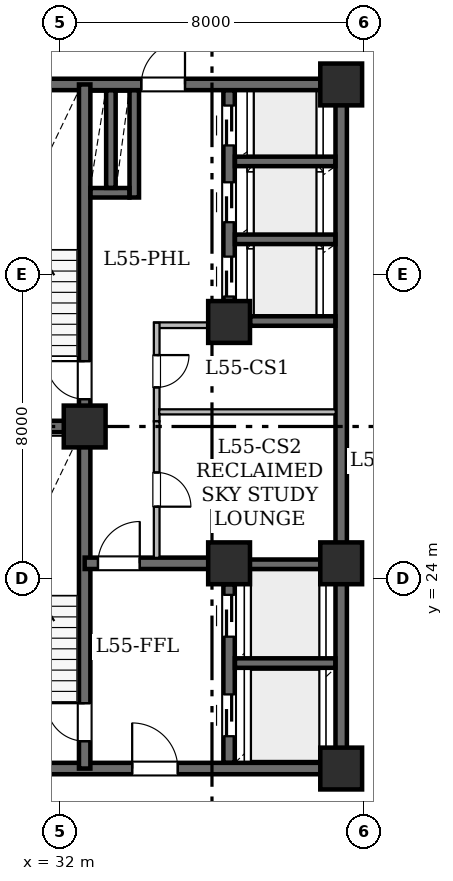
"""IFC4 building model, lengths in metres.
Left out: names, types, materials, properties, quantities, classifications, styles, units other than length and angle.
Written with IfcOpenShell. Run it as: python <this file> out.ifc"""

import sys

from ifc_helpers import new_model, si_unit, direction, frame, frame_2d, origin, origin_2d, place, context, subcontext, project, spatial, rectangle, hollow_rectangle, extrude, element, fill, save


model = new_model("IFC4")
c1 = context("Model", 3, precision=1e-05, world=origin(), true_north=direction((0.0, 1.0)))
c2 = subcontext(c1, "Body", "Model", "MODEL_VIEW")
j1 = project(units=[si_unit("LENGTHUNIT", "METRE"), si_unit("PLANEANGLEUNIT", "RADIAN")], contexts=[c1])
p1 = place(None, origin())
s1 = spatial("IfcSite", under=j1, at=p1, CompositionType="ELEMENT")
p2 = place(p1, origin())
s2 = spatial("IfcBuilding", under=s1, at=p2, CompositionType="ELEMENT")
p3 = place(p2, frame((0.0, 0.0, 217.2)))
s3 = spatial("IfcBuildingStorey", under=s2, at=p3, CompositionType="ELEMENT", Elevation=217.2)
for number, where, z_axis, x_axis in (
    (1, (32.65, 28.0, 0.0), (0.0, 0.0, 1.0), (1.0, 0.0, 0.0)),
    (2, (39.4, 19.0, 0.0), (0.0, 0.0, 1.0), (1.0, 0.0, 0.0)),
    (3, (36.45, 24.4, 0.0), (0.0, 0.0, 1.0), (1.0, 0.0, 0.0)),
    (4, (39.4, 24.4, 0.0), (0.0, 0.0, 1.0), (1.0, 0.0, 0.0)),
    (5, (36.45, 30.75, 0.0), (0.0, 0.0, 1.0), (1.0, 0.0, 0.0)),
    (6, (39.4, 37.0, 0.0), (0.0, 0.0, 1.0), (1.0, 0.0, 0.0)),
):
    element("IfcColumn", number, at=place(p3, frame(where, z_axis=z_axis, x_axis=x_axis)), inside=s3, PredefinedType="COLUMN", context=c2, shape_type="SweptSolid", body=[
        extrude(hollow_rectangle(XDim=1.1, YDim=1.1, WallThickness=0.055, at=origin_2d()), origin(), (0.0, 0.0, 1.0), 3.65),
    ])
p4 = place(p3, frame((29.0, 19.0, 0.0), z_axis=(0.0, 0.0, 1.0), x_axis=(1.0, 0.0, 0.0)))
e7 = element("IfcWall", 7, at=p4, inside=s3, PredefinedType="SHEAR", context=c2, shape_type="SweptSolid", body=[
    extrude(rectangle(XDim=10.4, YDim=0.3, at=frame_2d((5.2, 0.0))), origin(), (0.0, 0.0, 1.0), 3.43),
])
p5 = place(p4, frame((4.9, 0.0, 0.0)))
e8 = element("IfcOpeningElement", 8, at=p5, cuts=e7, PredefinedType="OPENING", context=c2, shape_type="SweptSolid", body=[
    extrude(rectangle(XDim=1.2, YDim=2.15, at=frame_2d((0.6, 1.075))), frame((0.0, 0.16, 0.0), z_axis=(0.0, -1.0, 0.0), x_axis=(1.0, 0.0, 0.0)), (0.0, 0.0, 1.0), 0.32),
])
p6 = place(p3, frame((29.0, 37.0, 0.0), z_axis=(0.0, 0.0, 1.0), x_axis=(1.0, 0.0, 0.0)))
e9 = element("IfcWall", 9, at=p6, inside=s3, PredefinedType="SHEAR", context=c2, shape_type="SweptSolid", body=[
    extrude(rectangle(XDim=10.4, YDim=0.3, at=frame_2d((5.2, 0.0))), origin(), (0.0, 0.0, 1.0), 3.43),
])
p7 = place(p6, frame((5.14, 0.0, 0.0)))
e10 = element("IfcOpeningElement", 10, at=p7, cuts=e9, PredefinedType="OPENING", context=c2, shape_type="SweptSolid", body=[
    extrude(rectangle(XDim=1.15, YDim=2.2, at=frame_2d((0.575, 1.1))), frame((0.0, 0.16, 0.0), z_axis=(0.0, -1.0, 0.0), x_axis=(1.0, 0.0, 0.0)), (0.0, 0.0, 1.0), 0.32),
])
p8 = place(p3, frame((39.4, 19.0, 0.0), z_axis=(0.0, 0.0, 1.0), x_axis=(0.0, 1.0, 0.0)))
e11 = element("IfcWall", 11, at=p8, inside=s3, PredefinedType="SHEAR", context=c2, shape_type="SweptSolid", body=[
    extrude(rectangle(XDim=5.4, YDim=0.3, at=frame_2d((2.7, 0.0))), origin(), (0.0, 0.0, 1.0), 3.43),
])
p9 = place(p3, frame((39.4, 24.4, 0.0), z_axis=(0.0, 0.0, 1.0), x_axis=(0.0, 1.0, 0.0)))
e12 = element("IfcWall", 12, at=p9, inside=s3, PredefinedType="SHEAR", context=c2, shape_type="SweptSolid", body=[
    extrude(rectangle(XDim=12.6, YDim=0.3, at=frame_2d((6.3, 0.0))), origin(), (0.0, 0.0, 1.0), 3.43),
])
p10 = place(p3, frame((32.65, 19.0, 0.0), z_axis=(0.0, 0.0, 1.0), x_axis=(0.0, 1.0, 0.0)))
e13 = element("IfcWall", 13, at=p10, inside=s3, PredefinedType="SHEAR", context=c2, shape_type="SweptSolid", body=[
    extrude(rectangle(XDim=9.0, YDim=0.3, at=frame_2d((4.5, 0.0))), origin(), (0.0, 0.0, 1.0), 3.43),
])
p11 = place(p10, frame((0.72, 0.0, 0.0)))
e14 = element("IfcOpeningElement", 14, at=p11, cuts=e13, PredefinedType="OPENING", context=c2, shape_type="SweptSolid", body=[
    extrude(rectangle(XDim=1.0, YDim=2.15, at=frame_2d((0.5, 1.075))), frame((0.0, 0.16, 0.0), z_axis=(0.0, -1.0, 0.0), x_axis=(1.0, 0.0, 0.0)), (0.0, 0.0, 1.0), 0.32),
])
p12 = place(p3, frame((32.65, 28.0, 0.0), z_axis=(0.0, 0.0, 1.0), x_axis=(0.0, 1.0, 0.0)))
e15 = element("IfcWall", 15, at=p12, inside=s3, PredefinedType="SHEAR", context=c2, shape_type="SweptSolid", body=[
    extrude(rectangle(XDim=9.0, YDim=0.3, at=frame_2d((4.5, 0.0))), origin(), (0.0, 0.0, 1.0), 3.43),
])
p13 = place(p12, frame((0.72, 0.0, 0.0)))
e16 = element("IfcOpeningElement", 16, at=p13, cuts=e15, PredefinedType="OPENING", context=c2, shape_type="SweptSolid", body=[
    extrude(rectangle(XDim=1.0, YDim=2.15, at=frame_2d((0.5, 1.075))), frame((0.0, 0.16, 0.0), z_axis=(0.0, -1.0, 0.0), x_axis=(1.0, 0.0, 0.0)), (0.0, 0.0, 1.0), 0.32),
])
p14 = place(p3, frame((29.0, 28.0, 0.0), z_axis=(0.0, 0.0, 1.0), x_axis=(1.0, 0.0, 0.0)))
e17 = element("IfcWall", 17, at=p14, inside=s3, PredefinedType="SHEAR", context=c2, shape_type="SweptSolid", body=[
    extrude(rectangle(XDim=3.65, YDim=0.3, at=frame_2d((1.825, 0.0))), origin(), (0.0, 0.0, 1.0), 3.43),
])
p15 = place(p3, frame((32.65, 24.4, 0.0), z_axis=(0.0, 0.0, 1.0), x_axis=(1.0, 0.0, 0.0)))
e18 = element("IfcWall", 18, at=p15, inside=s3, PredefinedType="SHEAR", context=c2, shape_type="SweptSolid", body=[
    extrude(rectangle(XDim=3.8, YDim=0.3, at=frame_2d((1.9, 0.0))), origin(), (0.0, 0.0, 1.0), 3.43),
])
p16 = place(p15, frame((0.35, 0.0, 0.0)))
e19 = element("IfcOpeningElement", 19, at=p16, cuts=e18, PredefinedType="OPENING", context=c2, shape_type="SweptSolid", body=[
    extrude(rectangle(XDim=1.1, YDim=2.15, at=frame_2d((0.55, 1.075))), frame((0.0, 0.16, 0.0), z_axis=(0.0, -1.0, 0.0), x_axis=(1.0, 0.0, 0.0)), (0.0, 0.0, 1.0), 0.32),
])
p17 = place(p3, frame((36.45, 19.154, 0.0), z_axis=(0.0, 0.0, 1.0), x_axis=(0.0, 1.0, 0.0)))
e20 = element("IfcWall", 20, at=p17, inside=s3, PredefinedType="SHEAR", context=c2, shape_type="SweptSolid", body=[
    extrude(rectangle(XDim=4.696, YDim=0.3, at=frame_2d((2.348, 0.0))), origin(), (0.0, 0.0, 1.0), 3.43),
])
p18 = place(p17, frame((0.696, 0.0, 0.0)))
e21 = element("IfcOpeningElement", 21, at=p18, cuts=e20, PredefinedType="OPENING", context=c2, shape_type="SweptSolid", body=[
    extrude(rectangle(XDim=1.1, YDim=2.15, at=frame_2d((0.55, 1.075))), frame((0.0, 0.16, 0.0), z_axis=(0.0, -1.0, 0.0), x_axis=(1.0, 0.0, 0.0)), (0.0, 0.0, 1.0), 0.32),
])
p19 = place(p17, frame((3.316, 0.0, 0.0)))
e22 = element("IfcOpeningElement", 22, at=p19, cuts=e20, PredefinedType="OPENING", context=c2, shape_type="SweptSolid", body=[
    extrude(rectangle(XDim=1.1, YDim=2.15, at=frame_2d((0.55, 1.075))), frame((0.0, 0.16, 0.0), z_axis=(0.0, -1.0, 0.0), x_axis=(1.0, 0.0, 0.0)), (0.0, 0.0, 1.0), 0.32),
])
p20 = place(p3, frame((36.45, 31.3, 0.0), z_axis=(0.0, 0.0, 1.0), x_axis=(0.0, 1.0, 0.0)))
e23 = element("IfcWall", 23, at=p20, inside=s3, PredefinedType="SHEAR", context=c2, shape_type="SweptSolid", body=[
    extrude(rectangle(XDim=5.546, YDim=0.3, at=frame_2d((2.773, 0.0))), origin(), (0.0, 0.0, 1.0), 3.43),
])
p21 = place(p20, frame((0.12, 0.0, 0.0)))
e24 = element("IfcOpeningElement", 24, at=p21, cuts=e23, PredefinedType="OPENING", context=c2, shape_type="SweptSolid", body=[
    extrude(rectangle(XDim=1.05, YDim=2.15, at=frame_2d((0.525, 1.075))), frame((0.0, 0.16, 0.0), z_axis=(0.0, -1.0, 0.0), x_axis=(1.0, 0.0, 0.0)), (0.0, 0.0, 1.0), 0.32),
])
p22 = place(p20, frame((2.075, 0.0, 0.0)))
e25 = element("IfcOpeningElement", 25, at=p22, cuts=e23, PredefinedType="OPENING", context=c2, shape_type="SweptSolid", body=[
    extrude(rectangle(XDim=1.05, YDim=2.15, at=frame_2d((0.525, 1.075))), frame((0.0, 0.16, 0.0), z_axis=(0.0, -1.0, 0.0), x_axis=(1.0, 0.0, 0.0)), (0.0, 0.0, 1.0), 0.32),
])
p23 = place(p20, frame((4.095, 0.0, 0.0)))
e26 = element("IfcOpeningElement", 26, at=p23, cuts=e23, PredefinedType="OPENING", context=c2, shape_type="SweptSolid", body=[
    extrude(rectangle(XDim=1.05, YDim=2.15, at=frame_2d((0.525, 1.075))), frame((0.0, 0.16, 0.0), z_axis=(0.0, -1.0, 0.0), x_axis=(1.0, 0.0, 0.0)), (0.0, 0.0, 1.0), 0.32),
])
for number, where, z_axis, x_axis in (
    (27, (36.604, 21.775, 0.0), (0.0, 0.0, 1.0), (1.0, 0.0, 0.0)),
    (28, (36.604, 24.375, 0.0), (0.0, 0.0, 1.0), (1.0, 0.0, 0.0)),
):
    element("IfcWall", number, at=place(p3, frame(where, z_axis=z_axis, x_axis=x_axis)), inside=s3, PredefinedType="SHEAR", context=c2, shape_type="SweptSolid", body=[
        extrude(rectangle(XDim=2.642, YDim=0.25, at=frame_2d((1.321, 0.0))), origin(), (0.0, 0.0, 1.0), 3.43),
    ])
p24 = place(p3, frame((37.004, 30.775, 0.0), z_axis=(0.0, 0.0, 1.0), x_axis=(1.0, 0.0, 0.0)))
e29 = element("IfcWall", 29, at=p24, inside=s3, PredefinedType="SHEAR", context=c2, shape_type="SweptSolid", body=[
    extrude(rectangle(XDim=2.242, YDim=0.25, at=frame_2d((1.121, 0.0))), origin(), (0.0, 0.0, 1.0), 3.43),
])
for number, where, z_axis, x_axis in (
    (30, (36.604, 32.925, 0.0), (0.0, 0.0, 1.0), (1.0, 0.0, 0.0)),
    (31, (36.604, 34.975, 0.0), (0.0, 0.0, 1.0), (1.0, 0.0, 0.0)),
):
    element("IfcWall", number, at=place(p3, frame(where, z_axis=z_axis, x_axis=x_axis)), inside=s3, PredefinedType="SHEAR", context=c2, shape_type="SweptSolid", body=[
        extrude(rectangle(XDim=2.642, YDim=0.25, at=frame_2d((1.321, 0.0))), origin(), (0.0, 0.0, 1.0), 3.43),
    ])
p25 = place(p3, frame((33.955, 34.025, 0.0), z_axis=(0.0, 0.0, 1.0), x_axis=(0.0, 1.0, 0.0)))
e32 = element("IfcWall", 32, at=p25, inside=s3, PredefinedType="SHEAR", context=c2, shape_type="SweptSolid", body=[
    extrude(rectangle(XDim=2.821, YDim=0.25, at=frame_2d((1.411, 0.0))), origin(), (0.0, 0.0, 1.0), 3.43),
])
p26 = place(p3, frame((32.804, 34.15, 0.0), z_axis=(0.0, 0.0, 1.0), x_axis=(1.0, 0.0, 0.0)))
e33 = element("IfcWall", 33, at=p26, inside=s3, PredefinedType="SHEAR", context=c2, shape_type="SweptSolid", body=[
    extrude(rectangle(XDim=1.022, YDim=0.25, at=frame_2d((0.511, 0.0))), origin(), (0.0, 0.0, 1.0), 3.43),
])
p27 = place(p3, frame((33.34, 34.279, 0.0), z_axis=(0.0, 0.0, 1.0), x_axis=(0.0, 1.0, 0.0)))
e34 = element("IfcWall", 34, at=p27, inside=s3, PredefinedType="SHEAR", context=c2, shape_type="SweptSolid", body=[
    extrude(rectangle(XDim=2.567, YDim=0.25, at=frame_2d((1.283, 0.0))), origin(), (0.0, 0.0, 1.0), 3.43),
])
p28 = place(p3, frame((36.3, 30.665, 0.0), z_axis=(0.0, 0.0, 1.0), x_axis=(-1.0, 0.0, 0.0)))
e35 = element("IfcWall", 35, at=p28, inside=s3, PredefinedType="STANDARD", context=c2, shape_type="SweptSolid", body=[
    extrude(rectangle(XDim=1.82, YDim=0.15, at=frame_2d((0.91, 0.0))), origin(), (0.0, 0.0, 1.0), 3.43),
])
p29 = place(p3, frame((34.545, 30.73, 0.0), z_axis=(0.0, 0.0, 1.0), x_axis=(0.0, -1.0, 0.0)))
e36 = element("IfcWall", 36, at=p29, inside=s3, PredefinedType="STANDARD", context=c2, shape_type="SweptSolid", body=[
    extrude(rectangle(XDim=2.594, YDim=0.15, at=frame_2d((1.297, 0.0))), origin(), (0.0, 0.0, 1.0), 3.43),
])
p30 = place(p29, frame((0.851, 0.0, 0.0)))
e37 = element("IfcOpeningElement", 37, at=p30, cuts=e36, PredefinedType="OPENING", context=c2, shape_type="SweptSolid", body=[
    extrude(rectangle(XDim=0.85, YDim=2.1, at=frame_2d((0.425, 1.05))), frame((0.0, 0.085, 0.0), z_axis=(0.0, -1.0, 0.0), x_axis=(1.0, 0.0, 0.0)), (0.0, 0.0, 1.0), 0.17),
])
p31 = place(p3, frame((34.545, 28.136, 0.0), z_axis=(0.0, 0.0, 1.0), x_axis=(0.0, -1.0, 0.0)))
e38 = element("IfcWall", 38, at=p31, inside=s3, PredefinedType="STANDARD", context=c2, shape_type="SweptSolid", body=[
    extrude(rectangle(XDim=3.592, YDim=0.15, at=frame_2d((1.796, 0.0))), origin(), (0.0, 0.0, 1.0), 3.43),
])
p32 = place(p31, frame((1.346, 0.0, 0.0)))
e39 = element("IfcOpeningElement", 39, at=p32, cuts=e38, PredefinedType="OPENING", context=c2, shape_type="SweptSolid", body=[
    extrude(rectangle(XDim=0.9, YDim=2.1, at=frame_2d((0.45, 1.05))), frame((0.0, 0.085, 0.0), z_axis=(0.0, -1.0, 0.0), x_axis=(1.0, 0.0, 0.0)), (0.0, 0.0, 1.0), 0.17),
])
p33 = place(p3, frame((39.256, 28.385, 0.0), z_axis=(0.0, 0.0, 1.0), x_axis=(-1.0, 0.0, 0.0)))
e40 = element("IfcWall", 40, at=p33, inside=s3, PredefinedType="PARTITIONING", context=c2, shape_type="SweptSolid", body=[
    extrude(rectangle(XDim=4.644, YDim=0.135, at=frame_2d((2.322, 0.0))), origin(), (0.0, 0.0, 1.0), 3.43),
])
p34 = place(p11, origin())
e41 = element("IfcDoor", 41, at=p34, inside=s3, OperationType="SINGLE_SWING_RIGHT", PredefinedType="DOOR", context=c2, shape_type="SweptSolid", body=[
    extrude(rectangle(XDim=1.0, YDim=2.15, at=frame_2d((0.5, 1.075))), frame((0.0, 0.025, 0.0), z_axis=(0.0, -1.0, 0.0), x_axis=(1.0, 0.0, 0.0)), (0.0, 0.0, 1.0), 0.05),
])
fill(e14, e41)
p35 = place(p13, origin())
e42 = element("IfcDoor", 42, at=p35, inside=s3, OperationType="SINGLE_SWING_RIGHT", PredefinedType="DOOR", context=c2, shape_type="SweptSolid", body=[
    extrude(rectangle(XDim=1.0, YDim=2.15, at=frame_2d((0.5, 1.075))), frame((0.0, 0.025, 0.0), z_axis=(0.0, -1.0, 0.0), x_axis=(1.0, 0.0, 0.0)), (0.0, 0.0, 1.0), 0.05),
])
fill(e16, e42)
p36 = place(p16, origin())
e43 = element("IfcDoor", 43, at=p36, inside=s3, OperationType="SINGLE_SWING_RIGHT", PredefinedType="DOOR", context=c2, shape_type="SweptSolid", body=[
    extrude(rectangle(XDim=1.1, YDim=2.15, at=frame_2d((0.55, 1.075))), frame((0.0, 0.025, 0.0), z_axis=(0.0, -1.0, 0.0), x_axis=(1.0, 0.0, 0.0)), (0.0, 0.0, 1.0), 0.05),
])
fill(e19, e43)
p37 = place(p5, origin())
e44 = element("IfcDoor", 44, at=p37, inside=s3, OperationType="SINGLE_SWING_LEFT", PredefinedType="DOOR", context=c2, shape_type="SweptSolid", body=[
    extrude(rectangle(XDim=1.2, YDim=2.15, at=frame_2d((0.6, 1.075))), frame((0.0, 0.025, 0.0), z_axis=(0.0, -1.0, 0.0), x_axis=(1.0, 0.0, 0.0)), (0.0, 0.0, 1.0), 0.05),
])
fill(e8, e44)
p38 = place(p7, origin())
e45 = element("IfcDoor", 45, at=p38, inside=s3, OperationType="SINGLE_SWING_RIGHT", PredefinedType="DOOR", context=c2, shape_type="SweptSolid", body=[
    extrude(rectangle(XDim=1.15, YDim=2.2, at=frame_2d((0.575, 1.1))), frame((0.0, 0.025, 0.0), z_axis=(0.0, -1.0, 0.0), x_axis=(1.0, 0.0, 0.0)), (0.0, 0.0, 1.0), 0.05),
])
fill(e10, e45)
p39 = place(p18, origin())
e46 = element("IfcDoor", 46, at=p39, inside=s3, OperationType="SLIDING_TO_LEFT", PredefinedType="DOOR", context=c2, shape_type="SweptSolid", body=[
    extrude(rectangle(XDim=1.1, YDim=2.15, at=frame_2d((0.55, 1.075))), frame((0.0, 0.025, 0.0), z_axis=(0.0, -1.0, 0.0), x_axis=(1.0, 0.0, 0.0)), (0.0, 0.0, 1.0), 0.05),
])
fill(e21, e46)
p40 = place(p19, origin())
e47 = element("IfcDoor", 47, at=p40, inside=s3, OperationType="SLIDING_TO_LEFT", PredefinedType="DOOR", context=c2, shape_type="SweptSolid", body=[
    extrude(rectangle(XDim=1.1, YDim=2.15, at=frame_2d((0.55, 1.075))), frame((0.0, 0.025, 0.0), z_axis=(0.0, -1.0, 0.0), x_axis=(1.0, 0.0, 0.0)), (0.0, 0.0, 1.0), 0.05),
])
fill(e22, e47)
p41 = place(p21, origin())
e48 = element("IfcDoor", 48, at=p41, inside=s3, OperationType="SLIDING_TO_LEFT", PredefinedType="DOOR", context=c2, shape_type="SweptSolid", body=[
    extrude(rectangle(XDim=1.05, YDim=2.15, at=frame_2d((0.525, 1.075))), frame((0.0, 0.025, 0.0), z_axis=(0.0, -1.0, 0.0), x_axis=(1.0, 0.0, 0.0)), (0.0, 0.0, 1.0), 0.05),
])
fill(e24, e48)
p42 = place(p22, origin())
e49 = element("IfcDoor", 49, at=p42, inside=s3, OperationType="SLIDING_TO_LEFT", PredefinedType="DOOR", context=c2, shape_type="SweptSolid", body=[
    extrude(rectangle(XDim=1.05, YDim=2.15, at=frame_2d((0.525, 1.075))), frame((0.0, 0.025, 0.0), z_axis=(0.0, -1.0, 0.0), x_axis=(1.0, 0.0, 0.0)), (0.0, 0.0, 1.0), 0.05),
])
fill(e25, e49)
p43 = place(p23, origin())
e50 = element("IfcDoor", 50, at=p43, inside=s3, OperationType="SLIDING_TO_LEFT", PredefinedType="DOOR", context=c2, shape_type="SweptSolid", body=[
    extrude(rectangle(XDim=1.05, YDim=2.15, at=frame_2d((0.525, 1.075))), frame((0.0, 0.025, 0.0), z_axis=(0.0, -1.0, 0.0), x_axis=(1.0, 0.0, 0.0)), (0.0, 0.0, 1.0), 0.05),
])
fill(e26, e50)
p44 = place(p30, origin())
e51 = element("IfcDoor", 51, at=p44, inside=s3, OperationType="SINGLE_SWING_LEFT", PredefinedType="DOOR", context=c2, shape_type="SweptSolid", body=[
    extrude(rectangle(XDim=0.85, YDim=2.1, at=frame_2d((0.425, 1.05))), frame((0.0, 0.025, 0.0), z_axis=(0.0, -1.0, 0.0), x_axis=(1.0, 0.0, 0.0)), (0.0, 0.0, 1.0), 0.05),
])
fill(e37, e51)
p45 = place(p32, origin())
e52 = element("IfcDoor", 52, at=p45, inside=s3, OperationType="SINGLE_SWING_RIGHT", PredefinedType="DOOR", context=c2, shape_type="SweptSolid", body=[
    extrude(rectangle(XDim=0.9, YDim=2.1, at=frame_2d((0.45, 1.05))), frame((0.0, 0.025, 0.0), z_axis=(0.0, -1.0, 0.0), x_axis=(1.0, 0.0, 0.0)), (0.0, 0.0, 1.0), 0.05),
])
fill(e39, e52)
save(model, sys.argv[1])
